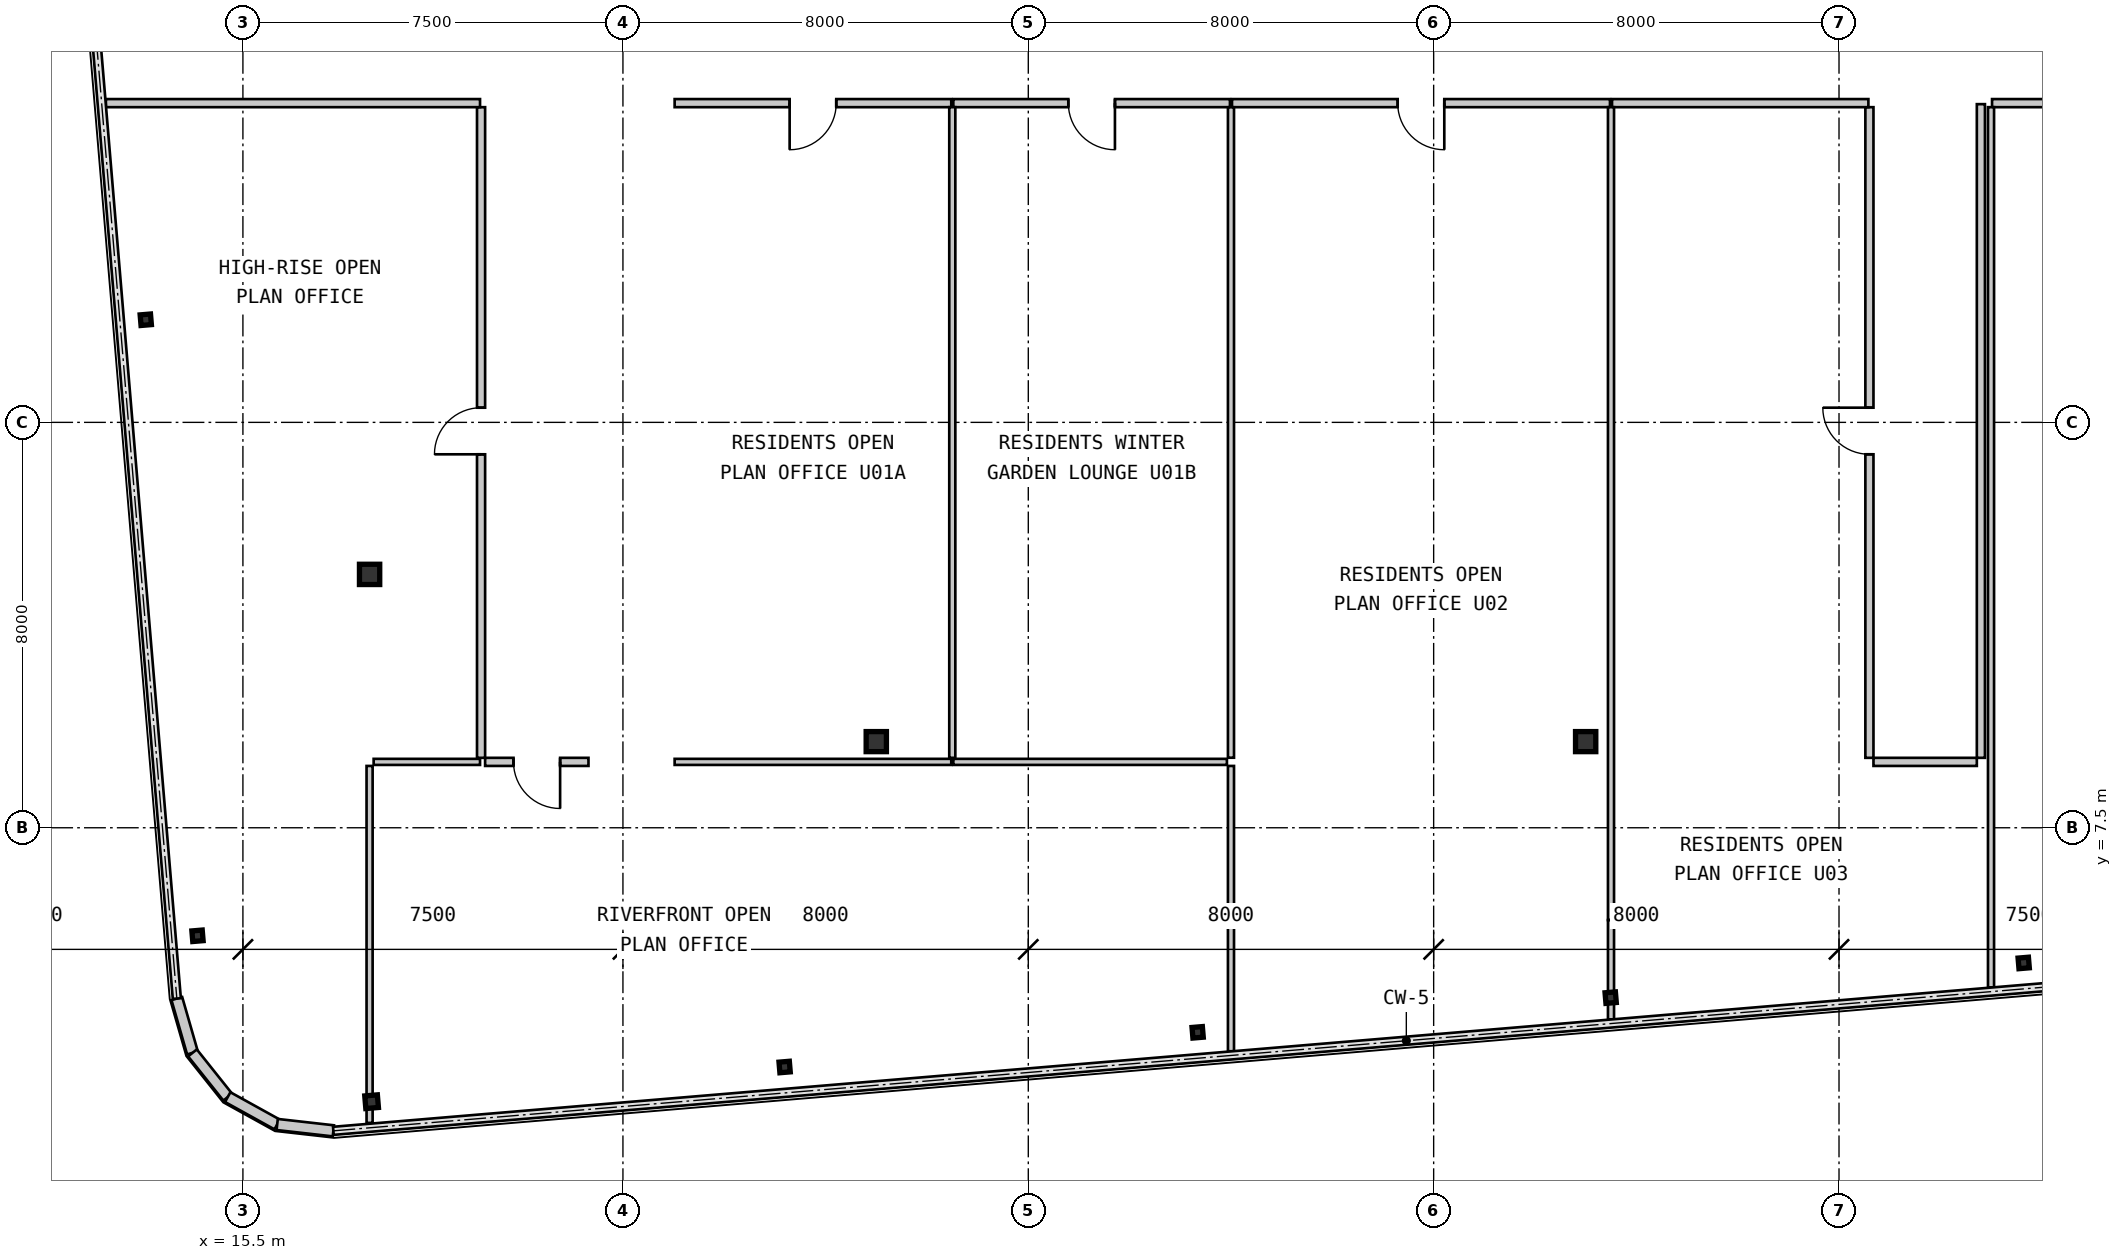
"""IFC4 building model, lengths in metres.
Left out: names, types, materials, properties, quantities, classifications, styles, units other than length and angle.
Written with IfcOpenShell. Run it as: python <this file> out.ifc"""

import sys

from ifc_helpers import new_model, si_unit, direction, frame, frame_2d, origin, origin_2d, place, context, subcontext, project, spatial, rectangle, hollow_rectangle, i_section, extrude, source, transform, mapped, element, fill, save


model = new_model("IFC4")
c1 = context("Model", 3, precision=1e-05, world=origin(), true_north=direction((0.0, 1.0)))
c2 = subcontext(c1, "Body", "Model", "MODEL_VIEW")
j1 = project(units=[si_unit("LENGTHUNIT", "METRE"), si_unit("PLANEANGLEUNIT", "RADIAN")], contexts=[c1])
p1 = place(None, origin())
s1 = spatial("IfcSite", under=j1, at=p1, CompositionType="ELEMENT")
p2 = place(p1, origin())
s2 = spatial("IfcBuilding", under=s1, at=p2, CompositionType="ELEMENT")
p3 = place(p2, frame((0.0, 0.0, 185.15)))
s3 = spatial("IfcBuildingStorey", under=s2, at=p3, CompositionType="ELEMENT", Elevation=185.15)
m1 = source(origin(), c2, "Body", "SweptSolid", [
    extrude(i_section(OverallWidth=0.4, OverallDepth=0.396, WebThickness=0.022, FlangeThickness=0.034, at=origin_2d()), origin(), (0.0, 0.0, 1.0), 3.15),
])
for number, where, z_axis, x_axis in (
    (1, (28.0, 9.2, 0.0), (0.0, 0.0, 1.0), (1.0, 0.0, 0.0)),
    (2, (42.0, 9.2, 0.0), (0.0, 0.0, 1.0), (1.0, 0.0, 0.0)),
):
    element("IfcColumn", number, at=place(p3, frame(where, z_axis=z_axis, x_axis=x_axis)), inside=s3, PredefinedType="COLUMN", context=c2, shape_type="MappedRepresentation", body=[
        mapped(m1, transform((0.0, 0.0, 0.0), scale=1.0)),
    ])
m2 = source(origin(), c2, "Body", "SweptSolid", [
    extrude(hollow_rectangle(XDim=0.4, YDim=0.4, WallThickness=0.016, at=origin_2d()), origin(), (0.0, 0.0, 1.0), 3.15),
])
p4 = place(p3, frame((18.0, 12.5, 0.0), z_axis=(0.0, 0.0, 1.0), x_axis=(1.0, 0.0, 0.0)))
e3 = element("IfcColumn", 3, at=p4, inside=s3, PredefinedType="COLUMN", context=c2, shape_type="MappedRepresentation", body=[
    mapped(m2, transform((0.0, 0.0, 0.0), scale=1.0)),
])
m3 = source(origin(), c2, "Body", "SweptSolid", [
    extrude(hollow_rectangle(XDim=0.25, YDim=0.25, WallThickness=0.01, at=origin_2d()), origin(), (0.0, 0.0, 1.0), 3.15),
])
p5 = place(p3, frame((18.04, 2.094, 0.0), z_axis=(0.0, 0.0, 1.0), x_axis=(0.99649285925, 0.083677843332, 0.0)))
e4 = element("IfcColumn", 4, at=p5, inside=s3, PredefinedType="COLUMN", context=c2, shape_type="MappedRepresentation", body=[
    mapped(m3, transform((0.0, 0.0, 0.0), scale=1.0)),
])
m4 = source(origin(), c2, "Body", "SweptSolid", [
    extrude(i_section(OverallWidth=0.205, OverallDepth=0.21, WebThickness=0.009, FlangeThickness=0.014, at=origin_2d()), origin(), (0.0, 0.0, 1.0), 3.15),
])
for number, where, z_axis, x_axis in (
    (5, (26.191, 2.779, 0.0), (0.0, 0.0, 1.0), (0.996, 0.084, 0.0)),
    (6, (34.342, 3.463, 0.0), (0.0, 0.0, 1.0), (0.996, 0.084, 0.0)),
    (7, (42.494, 4.147, 0.0), (0.0, 0.0, 1.0), (0.996, 0.084, 0.0)),
    (8, (50.645, 4.832, 0.0), (0.0, 0.0, 1.0), (0.996, 0.084, 0.0)),
    (9, (14.604, 5.368, 0.0), (0.0, 0.0, 1.0), (0.996, 0.084, 0.0)),
    (10, (13.583, 17.525, 0.0), (0.0, 0.0, 1.0), (0.996, 0.084, 0.0)),
):
    element("IfcColumn", number, at=place(p3, frame(where, z_axis=z_axis, x_axis=x_axis)), inside=s3, PredefinedType="COLUMN", context=c2, shape_type="MappedRepresentation", body=[
        mapped(m4, transform((0.0, 0.0, 0.0), scale=1.0)),
    ])
m5 = source(origin(), c2, "Body", "SweptSolid", [
    extrude(rectangle(XDim=1.116, YDim=0.22, at=frame_2d((0.558, 0.0))), origin(), (0.0, 0.0, 1.0), 2.93),
])
for number, where, z_axis, x_axis in (
    (11, (14.196, 4.13, 0.0), (0.0, 0.0, 1.0), (0.277, -0.961, 0.0)),
    (12, (14.504, 3.057, 0.0), (0.0, 0.0, 1.0), (0.623, -0.782, 0.0)),
    (13, (15.2, 2.184, 0.0), (0.0, 0.0, 1.0), (0.875, -0.484, 0.0)),
    (14, (16.176, 1.644, 0.0), (0.0, 0.0, 1.0), (0.994, -0.112, 0.0)),
):
    element("IfcWall", number, at=place(p3, frame(where, z_axis=z_axis, x_axis=x_axis)), inside=s3, PredefinedType="SOLIDWALL", context=c2, shape_type="MappedRepresentation", body=[
        mapped(m5, transform((0.0, 0.0, 0.0), scale=1.0)),
    ])
m6 = source(origin(), c2, "Body", "SweptSolid", [
    extrude(rectangle(XDim=2.04, YDim=0.16, at=frame_2d((1.02, 0.0))), origin(), (0.0, 0.0, 1.0), 2.93),
])
p6 = place(p3, frame((22.32, 8.8, 0.0), z_axis=(0.0, 0.0, 1.0), x_axis=(-1.0, 0.0, 0.0)))
e15 = element("IfcWall", 15, at=p6, inside=s3, PredefinedType="PARTITIONING", context=c2, shape_type="MappedRepresentation", body=[
    mapped(m6, transform((0.0, 0.0, 0.0), scale=1.0)),
])
m7 = source(origin(), c2, "Body", "SweptSolid", [
    extrude(rectangle(XDim=0.92, YDim=2.1, at=frame_2d((0.46, 1.05))), frame((0.0, 0.09, 0.0), z_axis=(0.0, -1.0, 0.0), x_axis=(1.0, 0.0, 0.0)), (0.0, 0.0, 1.0), 0.18),
])
p7 = place(p6, frame((0.56, 0.0, 0.0)))
e16 = element("IfcOpeningElement", 16, at=p7, cuts=e15, PredefinedType="OPENING", context=c2, shape_type="MappedRepresentation", body=[
    mapped(m7, transform((0.0, 0.0, 0.0), scale=1.0)),
])
m8 = source(origin(), c2, "Body", "SweptSolid", [
    extrude(rectangle(XDim=12.84, YDim=0.16, at=frame_2d((6.42, 0.0))), origin(), (0.0, 0.0, 1.0), 2.93),
])
p8 = place(p3, frame((20.2, 8.88, 0.0), z_axis=(0.0, 0.0, 1.0), x_axis=(0.0, 1.0, 0.0)))
e17 = element("IfcWall", 17, at=p8, inside=s3, PredefinedType="PARTITIONING", context=c2, shape_type="MappedRepresentation", body=[
    mapped(m8, transform((0.0, 0.0, 0.0), scale=1.0)),
])
p9 = place(p8, frame((5.99, 0.0, 0.0)))
e18 = element("IfcOpeningElement", 18, at=p9, cuts=e17, PredefinedType="OPENING", context=c2, shape_type="MappedRepresentation", body=[
    mapped(m7, transform((0.0, 0.0, 0.0), scale=1.0)),
])
m9 = source(origin(), c2, "Body", "SweptSolid", [
    extrude(rectangle(XDim=7.384, YDim=0.16, at=frame_2d((3.692, 0.0))), origin(), (0.0, 0.0, 1.0), 2.93),
])
p10 = place(p3, frame((20.18, 21.8, 0.0), z_axis=(0.0, 0.0, 1.0), x_axis=(-1.0, 0.0, 0.0)))
e19 = element("IfcWall", 19, at=p10, inside=s3, PredefinedType="PARTITIONING", context=c2, shape_type="MappedRepresentation", body=[
    mapped(m9, transform((0.0, 0.0, 0.0), scale=1.0)),
])
m10 = source(origin(), c2, "Body", "SweptSolid", [
    extrude(rectangle(XDim=5.459, YDim=0.16, at=frame_2d((2.73, 0.0))), origin(), (0.0, 0.0, 1.0), 2.93),
])
p11 = place(p3, frame((29.48, 21.8, 0.0), z_axis=(0.0, 0.0, 1.0), x_axis=(-1.0, 0.0, 0.0)))
e20 = element("IfcWall", 20, at=p11, inside=s3, PredefinedType="PARTITIONING", context=c2, shape_type="MappedRepresentation", body=[
    mapped(m10, transform((0.0, 0.0, 0.0), scale=1.0)),
])
p12 = place(p11, frame((2.27, 0.0, 0.0)))
e21 = element("IfcOpeningElement", 21, at=p12, cuts=e20, PredefinedType="OPENING", context=c2, shape_type="MappedRepresentation", body=[
    mapped(m7, transform((0.0, 0.0, 0.0), scale=1.0)),
])
p13 = place(p3, frame((34.98, 21.8, 0.0), z_axis=(0.0, 0.0, 1.0), x_axis=(-1.0, 0.0, 0.0)))
e22 = element("IfcWall", 22, at=p13, inside=s3, PredefinedType="PARTITIONING", context=c2, shape_type="MappedRepresentation", body=[
    mapped(m10, transform((0.0, 0.0, 0.0), scale=1.0)),
])
p14 = place(p13, frame((2.27, 0.0, 0.0)))
e23 = element("IfcOpeningElement", 23, at=p14, cuts=e22, PredefinedType="OPENING", context=c2, shape_type="MappedRepresentation", body=[
    mapped(m7, transform((0.0, 0.0, 0.0), scale=1.0)),
])
m11 = source(origin(), c2, "Body", "SweptSolid", [
    extrude(rectangle(XDim=7.459, YDim=0.16, at=frame_2d((3.73, 0.0))), origin(), (0.0, 0.0, 1.0), 2.93),
])
p15 = place(p3, frame((42.48, 21.8, 0.0), z_axis=(0.0, 0.0, 1.0), x_axis=(-1.0, 0.0, 0.0)))
e24 = element("IfcWall", 24, at=p15, inside=s3, PredefinedType="PARTITIONING", context=c2, shape_type="MappedRepresentation", body=[
    mapped(m11, transform((0.0, 0.0, 0.0), scale=1.0)),
])
p16 = place(p15, frame((3.27, 0.0, 0.0)))
e25 = element("IfcOpeningElement", 25, at=p16, cuts=e24, PredefinedType="OPENING", context=c2, shape_type="MappedRepresentation", body=[
    mapped(m7, transform((0.0, 0.0, 0.0), scale=1.0)),
])
p17 = place(p3, frame((47.6, 8.88, 0.0), z_axis=(0.0, 0.0, 1.0), x_axis=(0.0, 1.0, 0.0)))
e26 = element("IfcWall", 26, at=p17, inside=s3, PredefinedType="PARTITIONING", context=c2, shape_type="MappedRepresentation", body=[
    mapped(m8, transform((0.0, 0.0, 0.0), scale=1.0)),
])
p18 = place(p17, frame((5.99, 0.0, 0.0)))
e27 = element("IfcOpeningElement", 27, at=p18, cuts=e26, PredefinedType="OPENING", context=c2, shape_type="MappedRepresentation", body=[
    mapped(m7, transform((0.0, 0.0, 0.0), scale=1.0)),
])
m12 = source(origin(), c2, "Body", "SweptSolid", [
    extrude(rectangle(XDim=12.9, YDim=0.16, at=frame_2d((6.45, 0.0))), origin(), (0.0, 0.0, 1.0), 2.93),
])
p19 = place(p3, frame((49.8, 21.78, 0.0), z_axis=(0.0, 0.0, 1.0), x_axis=(0.0, -1.0, 0.0)))
e28 = element("IfcWall", 28, at=p19, inside=s3, PredefinedType="PARTITIONING", context=c2, shape_type="MappedRepresentation", body=[
    mapped(m12, transform((0.0, 0.0, 0.0), scale=1.0)),
])
m13 = source(origin(), c2, "Body", "SweptSolid", [
    extrude(rectangle(XDim=5.06, YDim=0.16, at=frame_2d((2.53, 0.0))), origin(), (0.0, 0.0, 1.0), 2.93),
])
p20 = place(p3, frame((47.58, 21.8, 0.0), z_axis=(0.0, 0.0, 1.0), x_axis=(-1.0, 0.0, 0.0)))
e29 = element("IfcWall", 29, at=p20, inside=s3, PredefinedType="PARTITIONING", context=c2, shape_type="MappedRepresentation", body=[
    mapped(m13, transform((0.0, 0.0, 0.0), scale=1.0)),
])
p21 = place(p3, frame((49.72, 8.8, 0.0), z_axis=(0.0, 0.0, 1.0), x_axis=(-1.0, 0.0, 0.0)))
e30 = element("IfcWall", 30, at=p21, inside=s3, PredefinedType="PARTITIONING", context=c2, shape_type="MappedRepresentation", body=[
    mapped(m6, transform((0.0, 0.0, 0.0), scale=1.0)),
])
m14 = source(origin(), c2, "Body", "SweptSolid", [
    extrude(rectangle(XDim=6.077, YDim=0.16, at=frame_2d((3.039, 0.0))), origin(), (0.0, 0.0, 1.0), 2.93),
])
p22 = place(p3, frame((56.097, 21.8, 0.0), z_axis=(0.0, 0.0, 1.0), x_axis=(-1.0, 0.0, 0.0)))
e31 = element("IfcWall", 31, at=p22, inside=s3, PredefinedType="PARTITIONING", context=c2, shape_type="MappedRepresentation", body=[
    mapped(m14, transform((0.0, 0.0, 0.0), scale=1.0)),
])
p23 = place(p22, frame((2.579, 0.0, 0.0)))
e32 = element("IfcOpeningElement", 32, at=p23, cuts=e31, PredefinedType="OPENING", context=c2, shape_type="MappedRepresentation", body=[
    mapped(m7, transform((0.0, 0.0, 0.0), scale=1.0)),
])
m15 = source(origin(), c2, "Body", "SweptSolid", [
    extrude(rectangle(XDim=0.418, YDim=0.12, at=frame_2d((0.209, 0.0))), origin(), (0.0, 0.0, 1.0), 2.93),
])
p24 = place(p3, frame((18.0, 1.676, 0.0), z_axis=(0.0, 0.0, 1.0), x_axis=(0.0, 1.0, 0.0)))
e33 = element("IfcWall", 33, at=p24, inside=s3, PredefinedType="PARTITIONING", context=c2, shape_type="MappedRepresentation", body=[
    mapped(m15, transform((0.0, 0.0, 0.0), scale=1.0)),
])
m16 = source(origin(), c2, "Body", "SweptSolid", [
    extrude(rectangle(XDim=6.626, YDim=0.12, at=frame_2d((3.313, 0.0))), origin(), (0.0, 0.0, 1.0), 2.47),
])
p25 = place(p3, frame((18.0, 2.094, 0.0), z_axis=(0.0, 0.0, 1.0), x_axis=(0.0, 1.0, 0.0)))
e34 = element("IfcWall", 34, at=p25, inside=s3, PredefinedType="PARTITIONING", context=c2, shape_type="MappedRepresentation", body=[
    mapped(m16, transform((0.0, 0.0, 0.0), scale=1.0)),
])
m17 = source(origin(), c2, "Body", "SweptSolid", [
    extrude(rectangle(XDim=2.1, YDim=0.12, at=frame_2d((1.05, 0.0))), origin(), (0.0, 0.0, 1.0), 2.93),
])
p26 = place(p3, frame((18.08, 8.8, 0.0), z_axis=(0.0, 0.0, 1.0), x_axis=(1.0, 0.0, 0.0)))
e35 = element("IfcWall", 35, at=p26, inside=s3, PredefinedType="PARTITIONING", context=c2, shape_type="MappedRepresentation", body=[
    mapped(m17, transform((0.0, 0.0, 0.0), scale=1.0)),
])
m18 = source(origin(), c2, "Body", "SweptSolid", [
    extrude(rectangle(XDim=5.459, YDim=0.12, at=frame_2d((2.73, 0.0))), origin(), (0.0, 0.0, 1.0), 2.93),
])
p27 = place(p3, frame((24.02, 8.8, 0.0), z_axis=(0.0, 0.0, 1.0), x_axis=(1.0, 0.0, 0.0)))
e36 = element("IfcWall", 36, at=p27, inside=s3, PredefinedType="PARTITIONING", context=c2, shape_type="MappedRepresentation", body=[
    mapped(m18, transform((0.0, 0.0, 0.0), scale=1.0)),
])
m19 = source(origin(), c2, "Body", "SweptSolid", [
    extrude(rectangle(XDim=5.4, YDim=0.12, at=frame_2d((2.7, 0.0))), origin(), (0.0, 0.0, 1.0), 2.93),
])
p28 = place(p3, frame((29.52, 8.8, 0.0), z_axis=(0.0, 0.0, 1.0), x_axis=(1.0, 0.0, 0.0)))
e37 = element("IfcWall", 37, at=p28, inside=s3, PredefinedType="PARTITIONING", context=c2, shape_type="MappedRepresentation", body=[
    mapped(m19, transform((0.0, 0.0, 0.0), scale=1.0)),
])
m20 = source(origin(), c2, "Body", "SweptSolid", [
    extrude(rectangle(XDim=5.63, YDim=0.12, at=frame_2d((2.815, 0.0))), origin(), (0.0, 0.0, 1.0), 2.93),
])
p29 = place(p3, frame((35.0, 8.72, 0.0), z_axis=(0.0, 0.0, 1.0), x_axis=(0.0, -1.0, 0.0)))
e38 = element("IfcWall", 38, at=p29, inside=s3, PredefinedType="PARTITIONING", context=c2, shape_type="MappedRepresentation", body=[
    mapped(m20, transform((0.0, 0.0, 0.0), scale=1.0)),
])
m21 = source(origin(), c2, "Body", "SweptSolid", [
    extrude(rectangle(XDim=12.84, YDim=0.12, at=frame_2d((6.42, 0.0))), origin(), (0.0, 0.0, 1.0), 2.93),
])
p30 = place(p3, frame((29.5, 21.72, 0.0), z_axis=(0.0, 0.0, 1.0), x_axis=(0.0, -1.0, 0.0)))
e39 = element("IfcWall", 39, at=p30, inside=s3, PredefinedType="PARTITIONING", context=c2, shape_type="MappedRepresentation", body=[
    mapped(m21, transform((0.0, 0.0, 0.0), scale=1.0)),
])
m22 = source(origin(), c2, "Body", "SweptSolid", [
    extrude(rectangle(XDim=12.836, YDim=0.12, at=frame_2d((6.418, 0.0))), origin(), (0.0, 0.0, 1.0), 2.93),
])
p31 = place(p3, frame((35.0, 21.718, 0.0), z_axis=(0.0, 0.0, 1.0), x_axis=(0.0, -1.0, 0.0)))
e40 = element("IfcWall", 40, at=p31, inside=s3, PredefinedType="PARTITIONING", context=c2, shape_type="MappedRepresentation", body=[
    mapped(m22, transform((0.0, 0.0, 0.0), scale=1.0)),
])
m23 = source(origin(), c2, "Body", "SweptSolid", [
    extrude(rectangle(XDim=16.042, YDim=0.12, at=frame_2d((8.021, 0.0))), origin(), (0.0, 0.0, 1.0), 2.93),
])
p32 = place(p3, frame((42.5, 21.72, 0.0), z_axis=(0.0, 0.0, 1.0), x_axis=(0.0, -1.0, 0.0)))
e41 = element("IfcWall", 41, at=p32, inside=s3, PredefinedType="PARTITIONING", context=c2, shape_type="MappedRepresentation", body=[
    mapped(m23, transform((0.0, 0.0, 0.0), scale=1.0)),
])
m24 = source(origin(), c2, "Body", "SweptSolid", [
    extrude(rectangle(XDim=1.536, YDim=0.12, at=frame_2d((0.768, 0.0))), origin(), (0.0, 0.0, 1.0), 2.47),
])
p33 = place(p3, frame((42.5, 5.678, 0.0), z_axis=(0.0, 0.0, 1.0), x_axis=(0.0, -1.0, 0.0)))
e42 = element("IfcWall", 42, at=p33, inside=s3, PredefinedType="PARTITIONING", context=c2, shape_type="MappedRepresentation", body=[
    mapped(m24, transform((0.0, 0.0, 0.0), scale=1.0)),
])
m25 = source(origin(), c2, "Body", "SweptSolid", [
    extrude(rectangle(XDim=0.423, YDim=0.12, at=frame_2d((0.211, 0.0))), origin(), (0.0, 0.0, 1.0), 2.93),
])
p34 = place(p3, frame((42.5, 4.142, 0.0), z_axis=(0.0, 0.0, 1.0), x_axis=(0.0, -1.0, 0.0)))
e43 = element("IfcWall", 43, at=p34, inside=s3, PredefinedType="PARTITIONING", context=c2, shape_type="MappedRepresentation", body=[
    mapped(m25, transform((0.0, 0.0, 0.0), scale=1.0)),
])
m26 = source(origin(), c2, "Body", "SweptSolid", [
    extrude(rectangle(XDim=17.37, YDim=0.12, at=frame_2d((8.685, 0.0))), origin(), (0.0, 0.0, 1.0), 2.93),
])
p35 = place(p3, frame((50.0, 21.72, 0.0), z_axis=(0.0, 0.0, 1.0), x_axis=(0.0, -1.0, 0.0)))
e44 = element("IfcWall", 44, at=p35, inside=s3, PredefinedType="PARTITIONING", context=c2, shape_type="MappedRepresentation", body=[
    mapped(m26, transform((0.0, 0.0, 0.0), scale=1.0)),
])
m27 = source(origin(), c2, "Body", "SweptSolid", [
    extrude(rectangle(XDim=0.92, YDim=2.1, at=frame_2d((0.46, 1.05))), frame((0.0, 0.025, 0.0), z_axis=(0.0, -1.0, 0.0), x_axis=(1.0, 0.0, 0.0)), (0.0, 0.0, 1.0), 0.05),
])
p36 = place(p7, origin())
e45 = element("IfcDoor", 45, at=p36, inside=s3, OperationType="SINGLE_SWING_LEFT", PredefinedType="DOOR", context=c2, shape_type="MappedRepresentation", body=[
    mapped(m27, transform((0.0, 0.0, 0.0), scale=1.0)),
])
fill(e16, e45)
p37 = place(p9, origin())
e46 = element("IfcDoor", 46, at=p37, inside=s3, OperationType="SINGLE_SWING_LEFT", PredefinedType="DOOR", context=c2, shape_type="MappedRepresentation", body=[
    mapped(m27, transform((0.0, 0.0, 0.0), scale=1.0)),
])
fill(e18, e46)
p38 = place(p12, origin())
e47 = element("IfcDoor", 47, at=p38, inside=s3, OperationType="SINGLE_SWING_RIGHT", PredefinedType="DOOR", context=c2, shape_type="MappedRepresentation", body=[
    mapped(m27, transform((0.0, 0.0, 0.0), scale=1.0)),
])
fill(e21, e47)
p39 = place(p14, origin())
e48 = element("IfcDoor", 48, at=p39, inside=s3, OperationType="SINGLE_SWING_LEFT", PredefinedType="DOOR", context=c2, shape_type="MappedRepresentation", body=[
    mapped(m27, transform((0.0, 0.0, 0.0), scale=1.0)),
])
fill(e23, e48)
p40 = place(p16, origin())
e49 = element("IfcDoor", 49, at=p40, inside=s3, OperationType="SINGLE_SWING_LEFT", PredefinedType="DOOR", context=c2, shape_type="MappedRepresentation", body=[
    mapped(m27, transform((0.0, 0.0, 0.0), scale=1.0)),
])
fill(e25, e49)
p41 = place(p18, origin())
e50 = element("IfcDoor", 50, at=p41, inside=s3, OperationType="SINGLE_SWING_RIGHT", PredefinedType="DOOR", context=c2, shape_type="MappedRepresentation", body=[
    mapped(m27, transform((0.0, 0.0, 0.0), scale=1.0)),
])
fill(e27, e50)
save(model, sys.argv[1])
